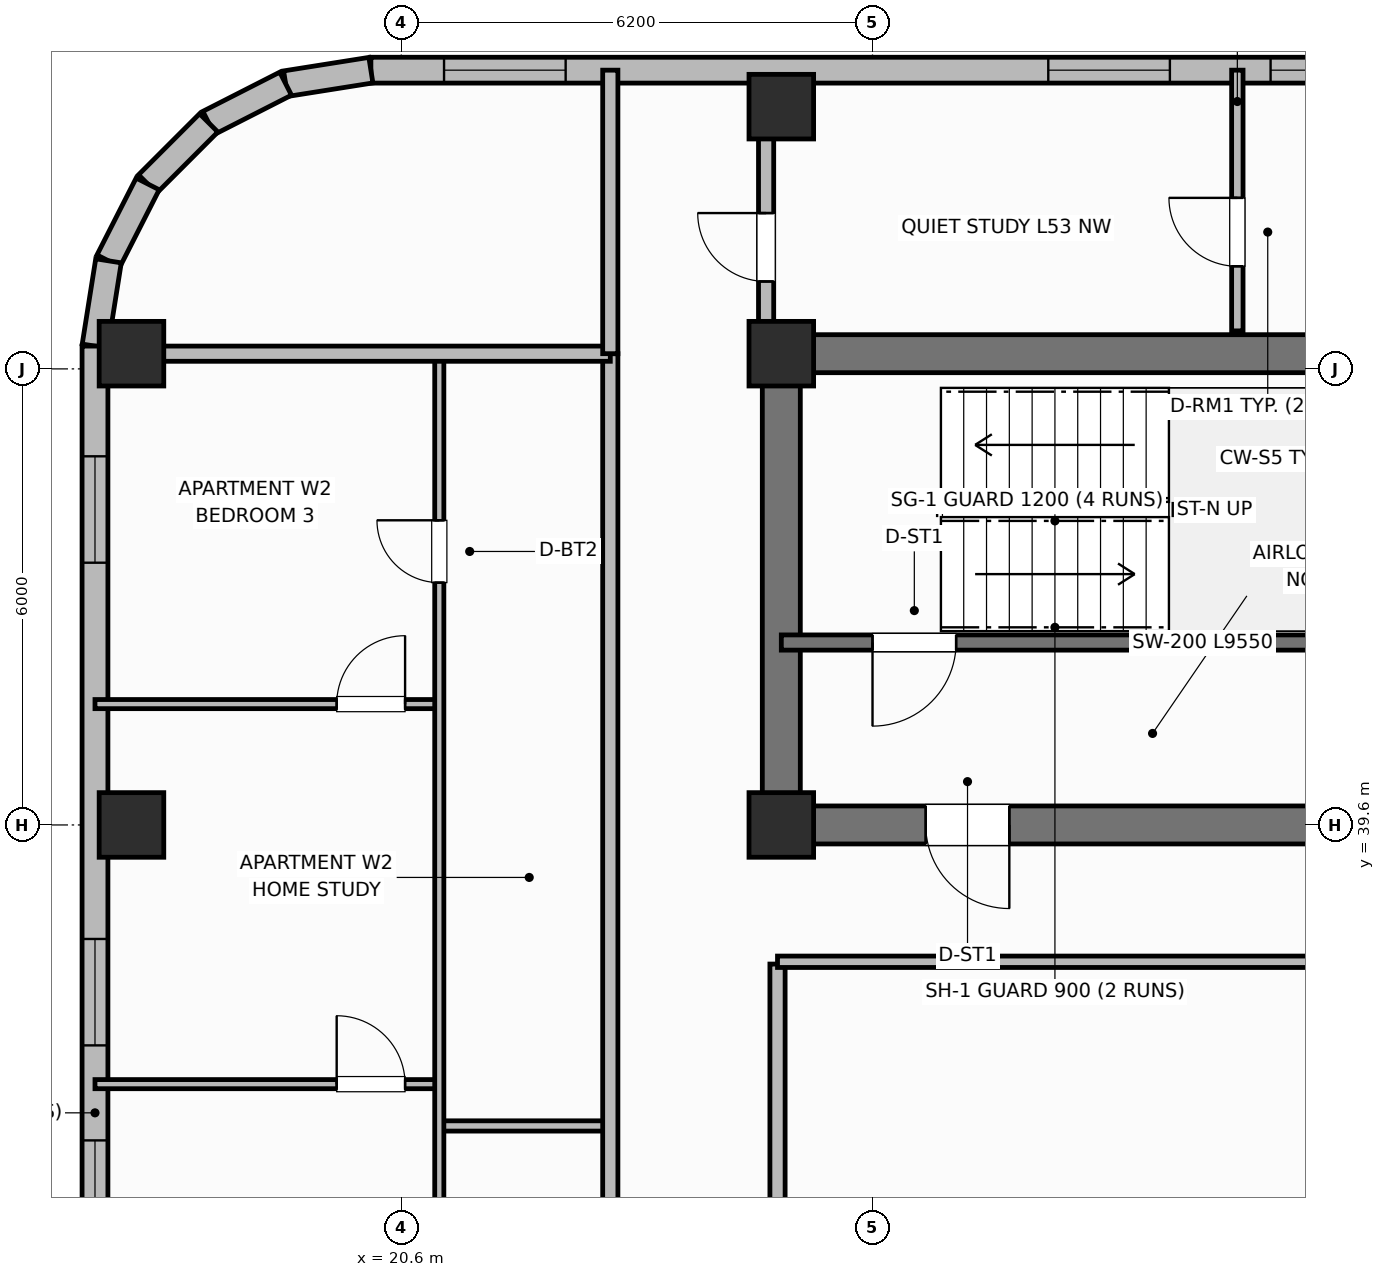
"""IFC4 building model, lengths in metres.
Left out: names, types, materials, properties, quantities, classifications, styles, units other than length and angle.
Written with IfcOpenShell. Run it as: python <this file> out.ifc"""

import sys

from ifc_helpers import new_model, si_unit, direction, frame, frame_2d, origin, origin_2d, place, context, subcontext, project, spatial, rectangle, extrude, element, fill, save


model = new_model("IFC4")
c1 = context("Model", 3, precision=1e-05, world=origin(), true_north=direction((0.0, 1.0)))
c2 = subcontext(c1, "Body", "Model", "MODEL_VIEW")
j1 = project(units=[si_unit("LENGTHUNIT", "METRE"), si_unit("PLANEANGLEUNIT", "RADIAN")], contexts=[c1])
p1 = place(None, origin())
s1 = spatial("IfcSite", under=j1, at=p1, CompositionType="ELEMENT")
p2 = place(p1, origin())
s2 = spatial("IfcBuilding", under=s1, at=p2, CompositionType="ELEMENT")
p3 = place(p2, frame((0.0, 0.0, 214.7)))
s3 = spatial("IfcBuildingStorey", under=s2, at=p3, CompositionType="ELEMENT", Elevation=214.7)
p4 = place(p3, frame((25.6, 45.8, 0.0), z_axis=(0.0, 0.0, 1.0), x_axis=(1.0, 0.0, 0.0)))
e1 = element("IfcWall", 1, at=p4, inside=s3, PredefinedType="SHEAR", context=c2, shape_type="SweptSolid", body=[
    extrude(rectangle(XDim=27.2, YDim=0.5, at=frame_2d((13.6, 0.0))), origin(), (0.0, 0.0, 1.0), 3.7),
])
p5 = place(p3, frame((25.6, 39.85, 0.0), z_axis=(0.0, 0.0, 1.0), x_axis=(0.0, 1.0, 0.0)))
e2 = element("IfcWall", 2, at=p5, inside=s3, PredefinedType="SHEAR", context=c2, shape_type="SweptSolid", body=[
    extrude(rectangle(XDim=5.7, YDim=0.5, at=frame_2d((2.85, 0.0))), origin(), (0.0, 0.0, 1.0), 3.7),
])
p6 = place(p3, frame((52.8, 39.6, 0.0), z_axis=(0.0, 0.0, 1.0), x_axis=(-1.0, 0.0, 0.0)))
e3 = element("IfcWall", 3, at=p6, inside=s3, PredefinedType="SHEAR", context=c2, shape_type="SweptSolid", body=[
    extrude(rectangle(XDim=27.2, YDim=0.5, at=frame_2d((13.6, 0.0))), origin(), (0.0, 0.0, 1.0), 3.7),
])
p7 = place(p6, frame((24.2, 0.0, 0.0)))
e4 = element("IfcOpeningElement", 4, at=p7, cuts=e3, PredefinedType="OPENING", context=c2, shape_type="SweptSolid", body=[
    extrude(rectangle(XDim=1.1, YDim=2.15, at=frame_2d((0.55, 1.075))), frame((0.0, 0.26, 0.0), z_axis=(0.0, -1.0, 0.0), x_axis=(1.0, 0.0, 0.0)), (0.0, 0.0, 1.0), 0.52),
])
p8 = place(p6, frame((15.1, 0.0, 0.0)))
e5 = element("IfcOpeningElement", 5, at=p8, cuts=e3, PredefinedType="OPENING", context=c2, shape_type="SweptSolid", body=[
    extrude(rectangle(XDim=1.2, YDim=2.15, at=frame_2d((0.6, 1.075))), frame((0.0, 0.26, 0.0), z_axis=(0.0, -1.0, 0.0), x_axis=(1.0, 0.0, 0.0)), (0.0, 0.0, 1.0), 0.52),
])
p9 = place(p6, frame((11.6, 0.0, 0.0)))
e6 = element("IfcOpeningElement", 6, at=p9, cuts=e3, PredefinedType="OPENING", context=c2, shape_type="SweptSolid", body=[
    extrude(rectangle(XDim=0.9, YDim=2.1, at=frame_2d((0.45, 1.05))), frame((0.0, 0.26, 0.0), z_axis=(0.0, -1.0, 0.0), x_axis=(1.0, 0.0, 0.0)), (0.0, 0.0, 1.0), 0.52),
])
p10 = place(p6, frame((7.35, 0.0, 0.0)))
e7 = element("IfcOpeningElement", 7, at=p10, cuts=e3, PredefinedType="OPENING", context=c2, shape_type="SweptSolid", body=[
    extrude(rectangle(XDim=0.85, YDim=2.1, at=frame_2d((0.425, 1.05))), frame((0.0, 0.26, 0.0), z_axis=(0.0, -1.0, 0.0), x_axis=(1.0, 0.0, 0.0)), (0.0, 0.0, 1.0), 0.52),
])
p11 = place(p6, frame((4.2, 0.0, 0.0)))
e8 = element("IfcOpeningElement", 8, at=p11, cuts=e3, PredefinedType="OPENING", context=c2, shape_type="SweptSolid", body=[
    extrude(rectangle(XDim=1.3, YDim=2.2, at=frame_2d((0.65, 1.1))), frame((0.0, 0.26, 0.0), z_axis=(0.0, -1.0, 0.0), x_axis=(1.0, 0.0, 0.0)), (0.0, 0.0, 1.0), 0.52),
])
for number, where, z_axis, x_axis in (
    (9, (25.6, 39.6, 0.0), (0.0, 0.0, 1.0), (1.0, 0.0, 0.0)),
    (10, (25.6, 45.8, 0.0), (0.0, 0.0, 1.0), (1.0, 0.0, 0.0)),
    (11, (25.6, 49.05, 0.0), (0.0, 0.0, 1.0), (1.0, 0.0, 0.0)),
    (12, (17.05, 39.6, 0.0), (0.0, 0.0, 1.0), (1.0, 0.0, 0.0)),
    (13, (17.05, 45.8, 0.0), (0.0, 0.0, 1.0), (1.0, 0.0, 0.0)),
):
    element("IfcColumn", number, at=place(p3, frame(where, z_axis=z_axis, x_axis=x_axis)), inside=s3, PredefinedType="COLUMN", context=c2, shape_type="SweptSolid", body=[
        extrude(rectangle(XDim=0.85, YDim=0.85, at=origin_2d()), origin(), (0.0, 0.0, 1.0), 3.7),
    ])
p12 = place(p3, frame((36.0, 49.53, 0.0), z_axis=(0.0, 0.0, 1.0), x_axis=(-1.0, 0.0, 0.0)))
e14 = element("IfcWall", 14, at=p12, inside=s3, PredefinedType="SOLIDWALL", context=c2, shape_type="SweptSolid", body=[
    extrude(rectangle(XDim=15.8, YDim=0.34, at=frame_2d((7.9, 0.0))), origin(), (0.0, 0.0, 1.0), 2.72),
])
p13 = place(p12, frame((2.363, 0.0, 0.7)))
e15 = element("IfcOpeningElement", 15, at=p13, cuts=e14, PredefinedType="OPENING", context=c2, shape_type="SweptSolid", body=[
    extrude(rectangle(XDim=1.6, YDim=1.9, at=frame_2d((0.8, 0.95))), frame((0.0, 0.18, 0.0), z_axis=(0.0, -1.0, 0.0), x_axis=(1.0, 0.0, 0.0)), (0.0, 0.0, 1.0), 0.36),
])
p14 = place(p12, frame((5.288, 0.0, 0.7)))
e16 = element("IfcOpeningElement", 16, at=p14, cuts=e14, PredefinedType="OPENING", context=c2, shape_type="SweptSolid", body=[
    extrude(rectangle(XDim=1.6, YDim=1.9, at=frame_2d((0.8, 0.95))), frame((0.0, 0.18, 0.0), z_axis=(0.0, -1.0, 0.0), x_axis=(1.0, 0.0, 0.0)), (0.0, 0.0, 1.0), 0.36),
])
p15 = place(p12, frame((13.238, 0.0, 0.7)))
e17 = element("IfcOpeningElement", 17, at=p15, cuts=e14, PredefinedType="OPENING", context=c2, shape_type="SweptSolid", body=[
    extrude(rectangle(XDim=1.6, YDim=1.9, at=frame_2d((0.8, 0.95))), frame((0.0, 0.18, 0.0), z_axis=(0.0, -1.0, 0.0), x_axis=(1.0, 0.0, 0.0)), (0.0, 0.0, 1.0), 0.36),
])
p16 = place(p3, frame((20.2, 49.53, 0.0), z_axis=(0.0, 0.0, 1.0), x_axis=(-0.987675651954, -0.156514556949, 0.0)))
e18 = element("IfcWall", 18, at=p16, inside=s3, PredefinedType="SOLIDWALL", context=c2, shape_type="SweptSolid", body=[
    extrude(rectangle(XDim=1.135, YDim=0.34, at=frame_2d((0.568, 0.0))), origin(), (0.0, 0.0, 1.0), 2.72),
])
for number, where, z_axis, x_axis in (
    (19, (19.078, 49.352, 0.0), (0.0, 0.0, 1.0), (-0.891, -0.454, 0.0)),
    (20, (18.066, 48.837, 0.0), (0.0, 0.0, 1.0), (-0.707, -0.707, 0.0)),
    (21, (17.263, 48.034, 0.0), (0.0, 0.0, 1.0), (-0.454, -0.891, 0.0)),
    (22, (16.748, 47.022, 0.0), (0.0, 0.0, 1.0), (-0.156, -0.988, 0.0)),
):
    element("IfcWall", number, at=place(p3, frame(where, z_axis=z_axis, x_axis=x_axis)), inside=s3, PredefinedType="SOLIDWALL", context=c2, shape_type="SweptSolid", body=[
        extrude(rectangle(XDim=1.136, YDim=0.34, at=frame_2d((0.568, 0.0))), origin(), (0.0, 0.0, 1.0), 2.72),
    ])
p17 = place(p3, frame((16.57, 45.9, 0.0), z_axis=(0.0, 0.0, 1.0), x_axis=(0.0, -1.0, 0.0)))
e23 = element("IfcWall", 23, at=p17, inside=s3, PredefinedType="SOLIDWALL", context=c2, shape_type="SweptSolid", body=[
    extrude(rectangle(XDim=13.3, YDim=0.34, at=frame_2d((6.65, 0.0))), origin(), (0.0, 0.0, 1.0), 2.72),
])
p18 = place(p17, frame((1.45, 0.0, 0.75)))
e24 = element("IfcOpeningElement", 24, at=p18, cuts=e23, PredefinedType="OPENING", context=c2, shape_type="SweptSolid", body=[
    extrude(rectangle(XDim=1.4, YDim=1.85, at=frame_2d((0.7, 0.925))), frame((0.0, 0.18, 0.0), z_axis=(0.0, -1.0, 0.0), x_axis=(1.0, 0.0, 0.0)), (0.0, 0.0, 1.0), 0.36),
])
p19 = place(p17, frame((7.8, 0.0, 0.75)))
e25 = element("IfcOpeningElement", 25, at=p19, cuts=e23, PredefinedType="OPENING", context=c2, shape_type="SweptSolid", body=[
    extrude(rectangle(XDim=1.4, YDim=1.85, at=frame_2d((0.7, 0.925))), frame((0.0, 0.18, 0.0), z_axis=(0.0, -1.0, 0.0), x_axis=(1.0, 0.0, 0.0)), (0.0, 0.0, 1.0), 0.36),
])
p20 = place(p17, frame((10.45, 0.0, 0.75)))
e26 = element("IfcOpeningElement", 26, at=p20, cuts=e23, PredefinedType="OPENING", context=c2, shape_type="SweptSolid", body=[
    extrude(rectangle(XDim=1.4, YDim=1.85, at=frame_2d((0.7, 0.925))), frame((0.0, 0.18, 0.0), z_axis=(0.0, -1.0, 0.0), x_axis=(1.0, 0.0, 0.0)), (0.0, 0.0, 1.0), 0.36),
])
p21 = place(p3, frame((35.15, 42.0, 0.0), z_axis=(0.0, 0.0, 1.0), x_axis=(-1.0, 0.0, 0.0)))
e27 = element("IfcWall", 27, at=p21, inside=s3, PredefinedType="SHEAR", context=c2, shape_type="SweptSolid", body=[
    extrude(rectangle(XDim=9.55, YDim=0.2, at=frame_2d((4.775, 0.0))), origin(), (0.0, 0.0, 1.0), 3.7),
])
p22 = place(p21, frame((7.25, 0.0, 0.0)))
e28 = element("IfcOpeningElement", 28, at=p22, cuts=e27, PredefinedType="OPENING", context=c2, shape_type="SweptSolid", body=[
    extrude(rectangle(XDim=1.1, YDim=2.15, at=frame_2d((0.55, 1.075))), frame((0.0, 0.11, 0.0), z_axis=(0.0, -1.0, 0.0), x_axis=(1.0, 0.0, 0.0)), (0.0, 0.0, 1.0), 0.22),
])
p23 = place(p3, frame((25.55, 18.63, 0.0), z_axis=(0.0, 0.0, 1.0), x_axis=(0.0, 1.0, 0.0)))
e29 = element("IfcWall", 29, at=p23, inside=s3, PredefinedType="PARTITIONING", context=c2, shape_type="SweptSolid", body=[
    extrude(rectangle(XDim=19.14, YDim=0.2, at=frame_2d((9.57, 0.0))), origin(), (0.0, 0.0, 1.0), 2.55),
])
p24 = place(p3, frame((25.55, 37.8, 0.0), z_axis=(0.0, 0.0, 1.0), x_axis=(1.0, 0.0, 0.0)))
e30 = element("IfcWall", 30, at=p24, inside=s3, PredefinedType="PARTITIONING", context=c2, shape_type="SweptSolid", body=[
    extrude(rectangle(XDim=22.2, YDim=0.15, at=frame_2d((11.1, 0.0))), origin(), (0.0, 0.0, 1.0), 2.55),
])
p25 = place(p3, frame((21.1, 35.64, 0.0), z_axis=(0.0, 0.0, 1.0), x_axis=(1.0, 0.0, 0.0)))
e31 = element("IfcWall", 31, at=p25, inside=s3, PredefinedType="PARTITIONING", context=c2, shape_type="SweptSolid", body=[
    extrude(rectangle(XDim=2.25, YDim=0.135, at=frame_2d((1.125, 0.0))), origin(), (0.0, 0.0, 1.0), 2.55),
])
p26 = place(p3, frame((16.57, 36.19, 0.0), z_axis=(0.0, 0.0, 1.0), x_axis=(1.0, 0.0, 0.0)))
e32 = element("IfcWall", 32, at=p26, inside=s3, PredefinedType="PARTITIONING", context=c2, shape_type="SweptSolid", body=[
    extrude(rectangle(XDim=4.53, YDim=0.12, at=frame_2d((2.265, 0.0))), origin(), (0.0, 0.0, 1.0), 2.55),
])
p27 = place(p26, frame((3.18, 0.0, 0.0)))
e33 = element("IfcOpeningElement", 33, at=p27, cuts=e32, PredefinedType="OPENING", context=c2, shape_type="SweptSolid", body=[
    extrude(rectangle(XDim=0.9, YDim=2.1, at=frame_2d((0.45, 1.05))), frame((0.0, 0.07, 0.0), z_axis=(0.0, -1.0, 0.0), x_axis=(1.0, 0.0, 0.0)), (0.0, 0.0, 1.0), 0.14),
])
p28 = place(p3, frame((16.57, 41.19, 0.0), z_axis=(0.0, 0.0, 1.0), x_axis=(1.0, 0.0, 0.0)))
e34 = element("IfcWall", 34, at=p28, inside=s3, PredefinedType="PARTITIONING", context=c2, shape_type="SweptSolid", body=[
    extrude(rectangle(XDim=4.53, YDim=0.12, at=frame_2d((2.265, 0.0))), origin(), (0.0, 0.0, 1.0), 2.55),
])
p29 = place(p28, frame((3.18, 0.0, 0.0)))
e35 = element("IfcOpeningElement", 35, at=p29, cuts=e34, PredefinedType="OPENING", context=c2, shape_type="SweptSolid", body=[
    extrude(rectangle(XDim=0.9, YDim=2.1, at=frame_2d((0.45, 1.05))), frame((0.0, 0.07, 0.0), z_axis=(0.0, -1.0, 0.0), x_axis=(1.0, 0.0, 0.0)), (0.0, 0.0, 1.0), 0.14),
])
p30 = place(p3, frame((21.1, 26.48, 0.0), z_axis=(0.0, 0.0, 1.0), x_axis=(0.0, 1.0, 0.0)))
e36 = element("IfcWall", 36, at=p30, inside=s3, PredefinedType="PARTITIONING", context=c2, shape_type="SweptSolid", body=[
    extrude(rectangle(XDim=19.28, YDim=0.12, at=frame_2d((9.64, 0.0))), origin(), (0.0, 0.0, 1.0), 2.55),
])
p31 = place(p30, frame((3.01, 0.0, 0.0)))
e37 = element("IfcOpeningElement", 37, at=p31, cuts=e36, PredefinedType="OPENING", context=c2, shape_type="SweptSolid", body=[
    extrude(rectangle(XDim=0.9, YDim=2.1, at=frame_2d((0.45, 1.05))), frame((0.0, 0.07, 0.0), z_axis=(0.0, -1.0, 0.0), x_axis=(1.0, 0.0, 0.0)), (0.0, 0.0, 1.0), 0.14),
])
p32 = place(p30, frame((16.308, 0.0, 0.0)))
e38 = element("IfcOpeningElement", 38, at=p32, cuts=e36, PredefinedType="OPENING", context=c2, shape_type="SweptSolid", body=[
    extrude(rectangle(XDim=0.82, YDim=2.08, at=frame_2d((0.41, 1.04))), frame((0.0, 0.07, 0.0), z_axis=(0.0, -1.0, 0.0), x_axis=(1.0, 0.0, 0.0)), (0.0, 0.0, 1.0), 0.14),
])
p33 = place(p3, frame((23.35, 10.6, 0.0), z_axis=(0.0, 0.0, 1.0), x_axis=(0.0, 1.0, 0.0)))
e39 = element("IfcWall", 39, at=p33, inside=s3, PredefinedType="PARTITIONING", context=c2, shape_type="SweptSolid", body=[
    extrude(rectangle(XDim=35.2, YDim=0.2, at=frame_2d((17.6, 0.0))), origin(), (0.0, 0.0, 1.0), 2.55),
])
p34 = place(p33, frame((2.65, 0.0, 0.0)))
e40 = element("IfcOpeningElement", 40, at=p34, cuts=e39, PredefinedType="OPENING", context=c2, shape_type="SweptSolid", body=[
    extrude(rectangle(XDim=1.0, YDim=2.15, at=frame_2d((0.5, 1.075))), frame((0.0, 0.11, 0.0), z_axis=(0.0, -1.0, 0.0), x_axis=(1.0, 0.0, 0.0)), (0.0, 0.0, 1.0), 0.22),
])
p35 = place(p33, frame((19.79, 0.0, 0.0)))
e41 = element("IfcOpeningElement", 41, at=p35, cuts=e39, PredefinedType="OPENING", context=c2, shape_type="SweptSolid", body=[
    extrude(rectangle(XDim=1.0, YDim=2.15, at=frame_2d((0.5, 1.075))), frame((0.0, 0.11, 0.0), z_axis=(0.0, -1.0, 0.0), x_axis=(1.0, 0.0, 0.0)), (0.0, 0.0, 1.0), 0.22),
])
p36 = place(p3, frame((16.99, 45.8, 0.0), z_axis=(0.0, 0.0, 1.0), x_axis=(1.0, 0.0, 0.0)))
e42 = element("IfcWall", 42, at=p36, inside=s3, PredefinedType="PARTITIONING", context=c2, shape_type="SweptSolid", body=[
    extrude(rectangle(XDim=6.36, YDim=0.2, at=frame_2d((3.18, 0.0))), origin(), (0.0, 0.0, 1.0), 2.55),
])
p37 = place(p3, frame((23.35, 45.8, 0.0), z_axis=(0.0, 0.0, 1.0), x_axis=(0.0, 1.0, 0.0)))
e43 = element("IfcWall", 43, at=p37, inside=s3, PredefinedType="PARTITIONING", context=c2, shape_type="SweptSolid", body=[
    extrude(rectangle(XDim=3.73, YDim=0.2, at=frame_2d((1.865, 0.0))), origin(), (0.0, 0.0, 1.0), 2.55),
])
p38 = place(p3, frame((31.6, 46.1, 0.0), z_axis=(0.0, 0.0, 1.0), x_axis=(0.0, 1.0, 0.0)))
e44 = element("IfcWall", 44, at=p38, inside=s3, PredefinedType="PARTITIONING", context=c2, shape_type="SweptSolid", body=[
    extrude(rectangle(XDim=3.43, YDim=0.15, at=frame_2d((1.715, 0.0))), origin(), (0.0, 0.0, 1.0), 2.55),
])
p39 = place(p38, frame((0.85, 0.0, 0.0)))
e45 = element("IfcOpeningElement", 45, at=p39, cuts=e44, PredefinedType="OPENING", context=c2, shape_type="SweptSolid", body=[
    extrude(rectangle(XDim=0.9, YDim=2.1, at=frame_2d((0.45, 1.05))), frame((0.0, 0.085, 0.0), z_axis=(0.0, -1.0, 0.0), x_axis=(1.0, 0.0, 0.0)), (0.0, 0.0, 1.0), 0.17),
])
p40 = place(p3, frame((25.4, 46.1, 0.0), z_axis=(0.0, 0.0, 1.0), x_axis=(0.0, 1.0, 0.0)))
e46 = element("IfcWall", 46, at=p40, inside=s3, PredefinedType="PARTITIONING", context=c2, shape_type="SweptSolid", body=[
    extrude(rectangle(XDim=2.73, YDim=0.2, at=frame_2d((1.365, 0.0))), origin(), (0.0, 0.0, 1.0), 2.55),
])
p41 = place(p40, frame((0.65, 0.0, 0.0)))
e47 = element("IfcOpeningElement", 47, at=p41, cuts=e46, PredefinedType="OPENING", context=c2, shape_type="SweptSolid", body=[
    extrude(rectangle(XDim=0.9, YDim=2.1, at=frame_2d((0.45, 1.05))), frame((0.0, 0.11, 0.0), z_axis=(0.0, -1.0, 0.0), x_axis=(1.0, 0.0, 0.0)), (0.0, 0.0, 1.0), 0.22),
])
p42 = place(p13, origin())
e48 = element("IfcWindow", 48, at=p42, inside=s3, PartitioningType="SINGLE_PANEL", PredefinedType="WINDOW", context=c2, shape_type="SweptSolid", body=[
    extrude(rectangle(XDim=1.6, YDim=1.9, at=frame_2d((0.8, 0.95))), frame((0.0, 0.03, 0.0), z_axis=(0.0, -1.0, 0.0), x_axis=(1.0, 0.0, 0.0)), (0.0, 0.0, 1.0), 0.06),
])
fill(e15, e48)
p43 = place(p14, origin())
e49 = element("IfcWindow", 49, at=p43, inside=s3, PartitioningType="SINGLE_PANEL", PredefinedType="WINDOW", context=c2, shape_type="SweptSolid", body=[
    extrude(rectangle(XDim=1.6, YDim=1.9, at=frame_2d((0.8, 0.95))), frame((0.0, 0.03, 0.0), z_axis=(0.0, -1.0, 0.0), x_axis=(1.0, 0.0, 0.0)), (0.0, 0.0, 1.0), 0.06),
])
fill(e16, e49)
p44 = place(p15, origin())
e50 = element("IfcWindow", 50, at=p44, inside=s3, PartitioningType="SINGLE_PANEL", PredefinedType="WINDOW", context=c2, shape_type="SweptSolid", body=[
    extrude(rectangle(XDim=1.6, YDim=1.9, at=frame_2d((0.8, 0.95))), frame((0.0, 0.03, 0.0), z_axis=(0.0, -1.0, 0.0), x_axis=(1.0, 0.0, 0.0)), (0.0, 0.0, 1.0), 0.06),
])
fill(e17, e50)
p45 = place(p18, origin())
e51 = element("IfcWindow", 51, at=p45, inside=s3, PartitioningType="SINGLE_PANEL", PredefinedType="WINDOW", context=c2, shape_type="SweptSolid", body=[
    extrude(rectangle(XDim=1.4, YDim=1.85, at=frame_2d((0.7, 0.925))), frame((0.0, 0.03, 0.0), z_axis=(0.0, -1.0, 0.0), x_axis=(1.0, 0.0, 0.0)), (0.0, 0.0, 1.0), 0.06),
])
fill(e24, e51)
p46 = place(p19, origin())
e52 = element("IfcWindow", 52, at=p46, inside=s3, PartitioningType="SINGLE_PANEL", PredefinedType="WINDOW", context=c2, shape_type="SweptSolid", body=[
    extrude(rectangle(XDim=1.4, YDim=1.85, at=frame_2d((0.7, 0.925))), frame((0.0, 0.03, 0.0), z_axis=(0.0, -1.0, 0.0), x_axis=(1.0, 0.0, 0.0)), (0.0, 0.0, 1.0), 0.06),
])
fill(e25, e52)
p47 = place(p20, origin())
e53 = element("IfcWindow", 53, at=p47, inside=s3, PartitioningType="SINGLE_PANEL", PredefinedType="WINDOW", context=c2, shape_type="SweptSolid", body=[
    extrude(rectangle(XDim=1.4, YDim=1.85, at=frame_2d((0.7, 0.925))), frame((0.0, 0.03, 0.0), z_axis=(0.0, -1.0, 0.0), x_axis=(1.0, 0.0, 0.0)), (0.0, 0.0, 1.0), 0.06),
])
fill(e26, e53)
p48 = place(p22, origin())
e54 = element("IfcDoor", 54, at=p48, inside=s3, OperationType="SINGLE_SWING_RIGHT", PredefinedType="DOOR", context=c2, shape_type="SweptSolid", body=[
    extrude(rectangle(XDim=1.1, YDim=2.15, at=frame_2d((0.55, 1.075))), frame((0.0, 0.025, 0.0), z_axis=(0.0, -1.0, 0.0), x_axis=(1.0, 0.0, 0.0)), (0.0, 0.0, 1.0), 0.05),
])
fill(e28, e54)
p49 = place(p27, origin())
e55 = element("IfcDoor", 55, at=p49, inside=s3, OperationType="SINGLE_SWING_LEFT", PredefinedType="DOOR", context=c2, shape_type="SweptSolid", body=[
    extrude(rectangle(XDim=0.9, YDim=2.1, at=frame_2d((0.45, 1.05))), frame((0.0, 0.025, 0.0), z_axis=(0.0, -1.0, 0.0), x_axis=(1.0, 0.0, 0.0)), (0.0, 0.0, 1.0), 0.05),
])
fill(e33, e55)
p50 = place(p29, origin())
e56 = element("IfcDoor", 56, at=p50, inside=s3, OperationType="SINGLE_SWING_RIGHT", PredefinedType="DOOR", context=c2, shape_type="SweptSolid", body=[
    extrude(rectangle(XDim=0.9, YDim=2.1, at=frame_2d((0.45, 1.05))), frame((0.0, 0.025, 0.0), z_axis=(0.0, -1.0, 0.0), x_axis=(1.0, 0.0, 0.0)), (0.0, 0.0, 1.0), 0.05),
])
fill(e35, e56)
p51 = place(p32, origin())
e57 = element("IfcDoor", 57, at=p51, inside=s3, OperationType="SINGLE_SWING_RIGHT", PredefinedType="DOOR", context=c2, shape_type="SweptSolid", body=[
    extrude(rectangle(XDim=0.82, YDim=2.08, at=frame_2d((0.41, 1.04))), frame((0.0, 0.025, 0.0), z_axis=(0.0, -1.0, 0.0), x_axis=(1.0, 0.0, 0.0)), (0.0, 0.0, 1.0), 0.05),
])
fill(e38, e57)
p52 = place(p39, origin())
e58 = element("IfcDoor", 58, at=p52, inside=s3, OperationType="SINGLE_SWING_RIGHT", PredefinedType="DOOR", context=c2, shape_type="SweptSolid", body=[
    extrude(rectangle(XDim=0.9, YDim=2.1, at=frame_2d((0.45, 1.05))), frame((0.0, 0.025, 0.0), z_axis=(0.0, -1.0, 0.0), x_axis=(1.0, 0.0, 0.0)), (0.0, 0.0, 1.0), 0.05),
])
fill(e45, e58)
p53 = place(p41, origin())
e59 = element("IfcDoor", 59, at=p53, inside=s3, OperationType="SINGLE_SWING_RIGHT", PredefinedType="DOOR", context=c2, shape_type="SweptSolid", body=[
    extrude(rectangle(XDim=0.9, YDim=2.1, at=frame_2d((0.45, 1.05))), frame((0.0, 0.025, 0.0), z_axis=(0.0, -1.0, 0.0), x_axis=(1.0, 0.0, 0.0)), (0.0, 0.0, 1.0), 0.05),
])
fill(e47, e59)
p54 = place(p7, origin())
e60 = element("IfcDoor", 60, at=p54, inside=s3, OperationType="SINGLE_SWING_LEFT", PredefinedType="DOOR", context=c2, shape_type="SweptSolid", body=[
    extrude(rectangle(XDim=1.1, YDim=2.15, at=frame_2d((0.55, 1.075))), frame((0.0, 0.025, 0.0), z_axis=(0.0, -1.0, 0.0), x_axis=(1.0, 0.0, 0.0)), (0.0, 0.0, 1.0), 0.05),
])
fill(e4, e60)
save(model, sys.argv[1])
